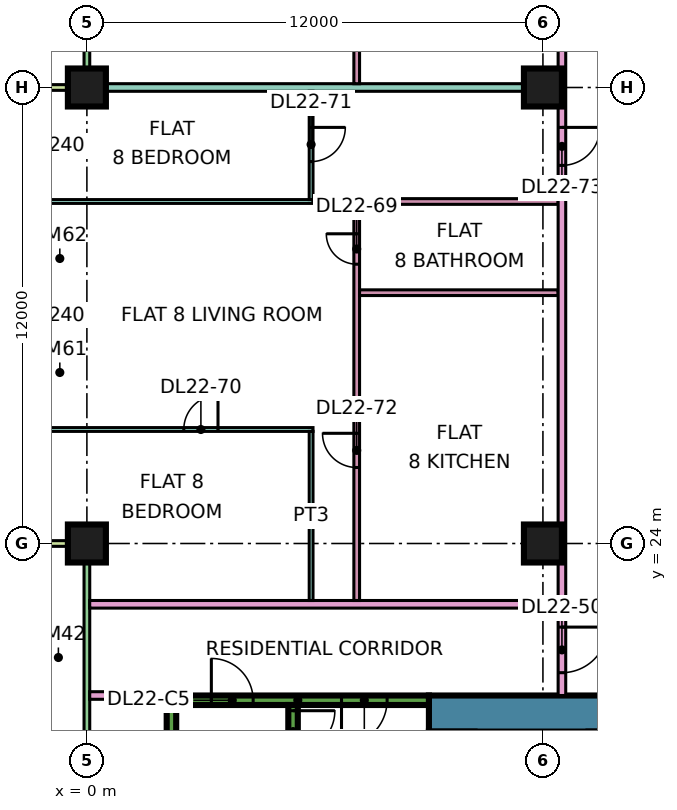
"""IFC4 building model, lengths in metres.
Left out: names, types, materials, properties, quantities, classifications, styles, units other than length and angle.
Written with IfcOpenShell. Run it as: python <this file> out.ifc"""

import sys

from ifc_helpers import new_model, si_unit, direction, frame, frame_2d, origin, origin_2d, place, context, subcontext, project, spatial, rectangle, extrude, element, fill, save


model = new_model("IFC4")
c1 = context("Model", 3, precision=1e-05, world=origin(), true_north=direction((0.0, 1.0)))
c2 = subcontext(c1, "Body", "Model", "MODEL_VIEW")
j1 = project(units=[si_unit("LENGTHUNIT", "METRE"), si_unit("PLANEANGLEUNIT", "RADIAN")], contexts=[c1])
p1 = place(None, origin())
s1 = spatial("IfcSite", under=j1, at=p1, CompositionType="ELEMENT")
p2 = place(p1, origin())
s2 = spatial("IfcBuilding", under=s1, at=p2, CompositionType="ELEMENT")
p3 = place(p2, frame((0.0, 0.0, 99.4)))
s3 = spatial("IfcBuildingStorey", under=s2, at=p3, CompositionType="ELEMENT", Elevation=99.4)
p4 = place(p3, frame((0.0, 24.0, 0.0), z_axis=(0.0, 0.0, 1.0), x_axis=(1.0, 0.0, 0.0)))
e1 = element("IfcColumn", 1, at=p4, inside=s3, PredefinedType="COLUMN", context=c2, shape_type="SweptSolid", body=[
    extrude(rectangle(XDim=1.0, YDim=1.0, at=origin_2d()), origin(), (0.0, 0.0, 1.0), 3.75),
])
p5 = place(p3, frame((0.0, 36.0, 0.0), z_axis=(0.0, 0.0, 1.0), x_axis=(1.0, 0.0, 0.0)))
e2 = element("IfcColumn", 2, at=p5, inside=s3, PredefinedType="COLUMN", context=c2, shape_type="SweptSolid", body=[
    extrude(rectangle(XDim=1.0, YDim=1.0, at=origin_2d()), origin(), (0.0, 0.0, 1.0), 3.75),
])
for number, where, z_axis, x_axis in (
    (3, (12.0, 24.0, 0.0), (0.0, 0.0, 1.0), (1.0, 0.0, 0.0)),
    (4, (12.0, 36.0, 0.0), (0.0, 0.0, 1.0), (1.0, 0.0, 0.0)),
):
    element("IfcColumn", number, at=place(p3, frame(where, z_axis=z_axis, x_axis=x_axis)), inside=s3, PredefinedType="COLUMN", context=c2, shape_type="SweptSolid", body=[
        extrude(rectangle(XDim=1.0, YDim=1.0, at=origin_2d()), origin(), (0.0, 0.0, 1.0), 3.75),
    ])
p6 = place(p3, frame((9.0, 19.525, 0.0), z_axis=(0.0, 0.0, 1.0), x_axis=(1.0, 0.0, 0.0)))
e5 = element("IfcWall", 5, at=p6, inside=s3, PredefinedType="SHEAR", context=c2, shape_type="SweptSolid", body=[
    extrude(rectangle(XDim=25.0, YDim=0.95, at=frame_2d((12.5, 0.0))), origin(), (0.0, 0.0, 1.0), 3.75),
])
p7 = place(p6, frame((19.1, 0.0, 0.0)))
e6 = element("IfcOpeningElement", 6, at=p7, cuts=e5, PredefinedType="OPENING", context=c2, shape_type="SweptSolid", body=[
    extrude(rectangle(XDim=1.8, YDim=2.4, at=frame_2d((0.9, 1.2))), frame((0.0, 0.485, 0.0), z_axis=(0.0, -1.0, 0.0), x_axis=(1.0, 0.0, 0.0)), (0.0, 0.0, 1.0), 0.97),
])
p8 = place(p3, frame((2.1, 19.875, 0.0), z_axis=(0.0, 0.0, 1.0), x_axis=(1.0, 0.0, 0.0)))
e7 = element("IfcWall", 7, at=p8, inside=s3, PredefinedType="SHEAR", context=c2, shape_type="SweptSolid", body=[
    extrude(rectangle(XDim=6.9, YDim=0.25, at=frame_2d((3.45, 0.0))), origin(), (0.0, 0.0, 1.0), 3.75),
])
p9 = place(p8, frame((1.175, 0.0, 0.0)))
e8 = element("IfcOpeningElement", 8, at=p9, cuts=e7, PredefinedType="OPENING", context=c2, shape_type="SweptSolid", body=[
    extrude(rectangle(XDim=1.1, YDim=2.2, at=frame_2d((0.55, 1.1))), frame((0.0, 0.135, 0.0), z_axis=(0.0, -1.0, 0.0), x_axis=(1.0, 0.0, 0.0)), (0.0, 0.0, 1.0), 0.27),
])
p10 = place(p8, frame((4.6, 0.0, 0.0)))
e9 = element("IfcOpeningElement", 9, at=p10, cuts=e7, PredefinedType="OPENING", context=c2, shape_type="SweptSolid", body=[
    extrude(rectangle(XDim=1.2, YDim=2.2, at=frame_2d((0.6, 1.1))), frame((0.0, 0.135, 0.0), z_axis=(0.0, -1.0, 0.0), x_axis=(1.0, 0.0, 0.0)), (0.0, 0.0, 1.0), 0.27),
])
p11 = place(p3, frame((2.225, 13.25, 0.0), z_axis=(0.0, 0.0, 1.0), x_axis=(0.0, 1.0, 0.0)))
e10 = element("IfcWall", 10, at=p11, inside=s3, PredefinedType="SHEAR", context=c2, shape_type="SweptSolid", body=[
    extrude(rectangle(XDim=6.5, YDim=0.25, at=frame_2d((3.25, 0.0))), origin(), (0.0, 0.0, 1.0), 3.75),
])
p12 = place(p3, frame((5.425, 13.25, 0.0), z_axis=(0.0, 0.0, 1.0), x_axis=(0.0, 1.0, 0.0)))
e11 = element("IfcWall", 11, at=p12, inside=s3, PredefinedType="SHEAR", context=c2, shape_type="SweptSolid", body=[
    extrude(rectangle(XDim=6.5, YDim=0.25, at=frame_2d((3.25, 0.0))), origin(), (0.0, 0.0, 1.0), 3.75),
])
p13 = place(p12, frame((5.25, 0.0, 0.0)))
e12 = element("IfcOpeningElement", 12, at=p13, cuts=e11, PredefinedType="OPENING", context=c2, shape_type="SweptSolid", body=[
    extrude(rectangle(XDim=1.1, YDim=2.2, at=frame_2d((0.55, 1.1))), frame((0.0, 0.135, 0.0), z_axis=(0.0, -1.0, 0.0), x_axis=(1.0, 0.0, 0.0)), (0.0, 0.0, 1.0), 0.27),
])
p14 = place(p3, frame((0.0, 47.925, 0.0), z_axis=(0.0, 0.0, 1.0), x_axis=(0.0, -1.0, 0.0)))
e13 = element("IfcWall", 13, at=p14, inside=s3, PredefinedType="SOLIDWALL", context=c2, shape_type="SweptSolid", body=[
    extrude(rectangle(XDim=11.85, YDim=0.15, at=frame_2d((5.925, 0.0))), origin(), (0.0, 0.0, 1.0), 3.35),
])
p15 = place(p14, frame((0.562, 0.0, 0.45)))
e14 = element("IfcOpeningElement", 14, at=p15, cuts=e13, PredefinedType="OPENING", context=c2, shape_type="SweptSolid", body=[
    extrude(rectangle(XDim=1.2, YDim=2.4, at=frame_2d((0.6, 1.2))), frame((0.0, 0.085, 0.0), z_axis=(0.0, -1.0, 0.0), x_axis=(1.0, 0.0, 0.0)), (0.0, 0.0, 1.0), 0.17),
])
p16 = place(p14, frame((4.125, 0.0, 0.0)))
e15 = element("IfcOpeningElement", 15, at=p16, cuts=e13, PredefinedType="OPENING", context=c2, shape_type="SweptSolid", body=[
    extrude(rectangle(XDim=1.2, YDim=2.4, at=frame_2d((0.6, 1.2))), frame((0.0, 0.085, 0.0), z_axis=(0.0, -1.0, 0.0), x_axis=(1.0, 0.0, 0.0)), (0.0, 0.0, 1.0), 0.17),
])
p17 = place(p14, frame((6.525, 0.0, 0.45)))
e16 = element("IfcOpeningElement", 16, at=p17, cuts=e13, PredefinedType="OPENING", context=c2, shape_type="SweptSolid", body=[
    extrude(rectangle(XDim=1.8, YDim=2.4, at=frame_2d((0.9, 1.2))), frame((0.0, 0.085, 0.0), z_axis=(0.0, -1.0, 0.0), x_axis=(1.0, 0.0, 0.0)), (0.0, 0.0, 1.0), 0.17),
])
p18 = place(p14, frame((9.525, 0.0, 0.45)))
e17 = element("IfcOpeningElement", 17, at=p18, cuts=e13, PredefinedType="OPENING", context=c2, shape_type="SweptSolid", body=[
    extrude(rectangle(XDim=1.2, YDim=2.4, at=frame_2d((0.6, 1.2))), frame((0.0, 0.085, 0.0), z_axis=(0.0, -1.0, 0.0), x_axis=(1.0, 0.0, 0.0)), (0.0, 0.0, 1.0), 0.17),
])
p19 = place(p3, frame((-1.5, 36.0, 0.0), z_axis=(0.0, 0.0, 1.0), x_axis=(1.0, 0.0, 0.0)))
e18 = element("IfcWall", 18, at=p19, inside=s3, PredefinedType="SOLIDWALL", context=c2, shape_type="SweptSolid", body=[
    extrude(rectangle(XDim=1.5, YDim=0.15, at=frame_2d((0.75, 0.0))), origin(), (0.0, 0.0, 1.0), 3.35),
])
p20 = place(p3, frame((0.0, 23.925, 0.0), z_axis=(0.0, 0.0, 1.0), x_axis=(0.0, -1.0, 0.0)))
e19 = element("IfcWall", 19, at=p20, inside=s3, PredefinedType="SOLIDWALL", context=c2, shape_type="SweptSolid", body=[
    extrude(rectangle(XDim=11.35, YDim=0.15, at=frame_2d((5.675, 0.0))), origin(), (0.0, 0.0, 1.0), 3.35),
])
p21 = place(p20, frame((6.738, 0.0, 0.0)))
e20 = element("IfcOpeningElement", 20, at=p21, cuts=e19, PredefinedType="OPENING", context=c2, shape_type="SweptSolid", body=[
    extrude(rectangle(XDim=1.8, YDim=2.4, at=frame_2d((0.9, 1.2))), frame((0.0, 0.085, 0.0), z_axis=(0.0, -1.0, 0.0), x_axis=(1.0, 0.0, 0.0)), (0.0, 0.0, 1.0), 0.17),
])
p22 = place(p3, frame((-1.5, 24.0, 0.0), z_axis=(0.0, 0.0, 1.0), x_axis=(1.0, 0.0, 0.0)))
e21 = element("IfcWall", 21, at=p22, inside=s3, PredefinedType="SOLIDWALL", context=c2, shape_type="SweptSolid", body=[
    extrude(rectangle(XDim=1.5, YDim=0.15, at=frame_2d((0.75, 0.0))), origin(), (0.0, 0.0, 1.0), 3.35),
])
p23 = place(p3, frame((-1.35, 27.0, 0.0), z_axis=(0.0, 0.0, 1.0), x_axis=(1.0, 0.0, 0.0)))
e22 = element("IfcWall", 22, at=p23, inside=s3, PredefinedType="PARTITIONING", context=c2, shape_type="SweptSolid", body=[
    extrude(rectangle(XDim=7.3, YDim=0.1, at=frame_2d((3.65, 0.0))), origin(), (0.0, 0.0, 1.0), 3.35),
])
p24 = place(p23, frame((3.9, 0.0, 0.0)))
e23 = element("IfcOpeningElement", 23, at=p24, cuts=e22, PredefinedType="OPENING", context=c2, shape_type="SweptSolid", body=[
    extrude(rectangle(XDim=0.9, YDim=2.1, at=frame_2d((0.45, 1.05))), frame((0.0, 0.06, 0.0), z_axis=(0.0, -1.0, 0.0), x_axis=(1.0, 0.0, 0.0)), (0.0, 0.0, 1.0), 0.12),
])
p25 = place(p3, frame((-1.35, 33.0, 0.0), z_axis=(0.0, 0.0, 1.0), x_axis=(1.0, 0.0, 0.0)))
e24 = element("IfcWall", 24, at=p25, inside=s3, PredefinedType="PARTITIONING", context=c2, shape_type="SweptSolid", body=[
    extrude(rectangle(XDim=7.3, YDim=0.1, at=frame_2d((3.65, 0.0))), origin(), (0.0, 0.0, 1.0), 3.35),
])
e25 = element("IfcWall", 25, at=p5, inside=s3, PredefinedType="PARTITIONING", context=c2, shape_type="SweptSolid", body=[
    extrude(rectangle(XDim=12.4, YDim=0.2, at=frame_2d((6.2, 0.0))), origin(), (0.0, 0.0, 1.0), 3.35),
])
p26 = place(p3, frame((0.074, 20.0, 0.0), z_axis=(0.0, 0.0, 1.0), x_axis=(1.0, 0.0, 0.0)))
e26 = element("IfcWall", 26, at=p26, inside=s3, PredefinedType="PARTITIONING", context=c2, shape_type="SweptSolid", body=[
    extrude(rectangle(XDim=2.026, YDim=0.2, at=frame_2d((1.013, 0.0))), origin(), (0.0, 0.0, 1.0), 3.35),
])
p27 = place(p3, frame((0.074, 22.4, 0.0), z_axis=(0.0, 0.0, 1.0), x_axis=(1.0, 0.0, 0.0)))
e27 = element("IfcWall", 27, at=p27, inside=s3, PredefinedType="PARTITIONING", context=c2, shape_type="SweptSolid", body=[
    extrude(rectangle(XDim=12.326, YDim=0.2, at=frame_2d((6.163, 0.0))), origin(), (0.0, 0.0, 1.0), 3.35),
])
p28 = place(p3, frame((5.9, 22.5, 0.0), z_axis=(0.0, 0.0, 1.0), x_axis=(0.0, 1.0, 0.0)))
e28 = element("IfcWall", 28, at=p28, inside=s3, PredefinedType="PARTITIONING", context=c2, shape_type="SweptSolid", body=[
    extrude(rectangle(XDim=4.45, YDim=0.1, at=frame_2d((2.225, 0.0))), origin(), (0.0, 0.0, 1.0), 3.35),
])
p29 = place(p3, frame((5.9, 33.05, 0.0), z_axis=(0.0, 0.0, 1.0), x_axis=(0.0, 1.0, 0.0)))
e29 = element("IfcWall", 29, at=p29, inside=s3, PredefinedType="PARTITIONING", context=c2, shape_type="SweptSolid", body=[
    extrude(rectangle(XDim=2.85, YDim=0.1, at=frame_2d((1.425, 0.0))), origin(), (0.0, 0.0, 1.0), 3.35),
])
p30 = place(p29, frame((1.0, 0.0, 0.0)))
e30 = element("IfcOpeningElement", 30, at=p30, cuts=e29, PredefinedType="OPENING", context=c2, shape_type="SweptSolid", body=[
    extrude(rectangle(XDim=0.9, YDim=2.1, at=frame_2d((0.45, 1.05))), frame((0.0, 0.06, 0.0), z_axis=(0.0, -1.0, 0.0), x_axis=(1.0, 0.0, 0.0)), (0.0, 0.0, 1.0), 0.12),
])
p31 = place(p3, frame((7.1, 22.5, 0.0), z_axis=(0.0, 0.0, 1.0), x_axis=(0.0, 1.0, 0.0)))
e31 = element("IfcWall", 31, at=p31, inside=s3, PredefinedType="PARTITIONING", context=c2, shape_type="SweptSolid", body=[
    extrude(rectangle(XDim=10.575, YDim=0.15, at=frame_2d((5.288, 0.0))), origin(), (0.0, 0.0, 1.0), 3.35),
])
p32 = place(p31, frame((8.85, 0.0, 0.0)))
e32 = element("IfcOpeningElement", 32, at=p32, cuts=e31, PredefinedType="OPENING", context=c2, shape_type="SweptSolid", body=[
    extrude(rectangle(XDim=0.8, YDim=2.1, at=frame_2d((0.4, 1.05))), frame((0.0, 0.085, 0.0), z_axis=(0.0, -1.0, 0.0), x_axis=(1.0, 0.0, 0.0)), (0.0, 0.0, 1.0), 0.17),
])
p33 = place(p31, frame((3.5, 0.0, 0.0)))
e33 = element("IfcOpeningElement", 33, at=p33, cuts=e31, PredefinedType="OPENING", context=c2, shape_type="SweptSolid", body=[
    extrude(rectangle(XDim=0.9, YDim=2.1, at=frame_2d((0.45, 1.05))), frame((0.0, 0.085, 0.0), z_axis=(0.0, -1.0, 0.0), x_axis=(1.0, 0.0, 0.0)), (0.0, 0.0, 1.0), 0.17),
])
p34 = place(p3, frame((7.1, 36.1, 0.0), z_axis=(0.0, 0.0, 1.0), x_axis=(0.0, 1.0, 0.0)))
e34 = element("IfcWall", 34, at=p34, inside=s3, PredefinedType="PARTITIONING", context=c2, shape_type="SweptSolid", body=[
    extrude(rectangle(XDim=11.375, YDim=0.15, at=frame_2d((5.688, 0.0))), origin(), (0.0, 0.0, 1.0), 3.35),
])
p35 = place(p34, frame((7.4, 0.0, 0.0)))
e35 = element("IfcOpeningElement", 35, at=p35, cuts=e34, PredefinedType="OPENING", context=c2, shape_type="SweptSolid", body=[
    extrude(rectangle(XDim=0.8, YDim=2.1, at=frame_2d((0.4, 1.05))), frame((0.0, 0.085, 0.0), z_axis=(0.0, -1.0, 0.0), x_axis=(1.0, 0.0, 0.0)), (0.0, 0.0, 1.0), 0.17),
])
p36 = place(p34, frame((2.75, 0.0, 0.0)))
e36 = element("IfcOpeningElement", 36, at=p36, cuts=e34, PredefinedType="OPENING", context=c2, shape_type="SweptSolid", body=[
    extrude(rectangle(XDim=0.9, YDim=2.1, at=frame_2d((0.45, 1.05))), frame((0.0, 0.085, 0.0), z_axis=(0.0, -1.0, 0.0), x_axis=(1.0, 0.0, 0.0)), (0.0, 0.0, 1.0), 0.17),
])
p37 = place(p34, frame((9.8, 0.0, 0.0)))
e37 = element("IfcOpeningElement", 37, at=p37, cuts=e34, PredefinedType="OPENING", context=c2, shape_type="SweptSolid", body=[
    extrude(rectangle(XDim=0.8, YDim=2.1, at=frame_2d((0.4, 1.05))), frame((0.0, 0.085, 0.0), z_axis=(0.0, -1.0, 0.0), x_axis=(1.0, 0.0, 0.0)), (0.0, 0.0, 1.0), 0.17),
])
for number, where, z_axis, x_axis in (
    (38, (7.175, 30.6, 0.0), (0.0, 0.0, 1.0), (1.0, 0.0, 0.0)),
    (39, (7.175, 33.0, 0.0), (0.0, 0.0, 1.0), (1.0, 0.0, 0.0)),
):
    element("IfcWall", number, at=place(p3, frame(where, z_axis=z_axis, x_axis=x_axis)), inside=s3, PredefinedType="PARTITIONING", context=c2, shape_type="SweptSolid", body=[
        extrude(rectangle(XDim=5.225, YDim=0.15, at=frame_2d((2.612, 0.0))), origin(), (0.0, 0.0, 1.0), 3.35),
    ])
p38 = place(p3, frame((12.5, 20.0, 0.0), z_axis=(0.0, 0.0, 1.0), x_axis=(0.0, 1.0, 0.0)))
e40 = element("IfcWall", 40, at=p38, inside=s3, PredefinedType="PARTITIONING", context=c2, shape_type="SweptSolid", body=[
    extrude(rectangle(XDim=42.926, YDim=0.2, at=frame_2d((21.463, 0.0))), origin(), (0.0, 0.0, 1.0), 3.35),
])
p39 = place(p38, frame((28.65, 0.0, 0.0)))
e41 = element("IfcOpeningElement", 41, at=p39, cuts=e40, PredefinedType="OPENING", context=c2, shape_type="SweptSolid", body=[
    extrude(rectangle(XDim=1.0, YDim=2.1, at=frame_2d((0.5, 1.05))), frame((0.0, 0.11, 0.0), z_axis=(0.0, -1.0, 0.0), x_axis=(1.0, 0.0, 0.0)), (0.0, 0.0, 1.0), 0.22),
])
p40 = place(p38, frame((32.1, 0.0, 0.0)))
e42 = element("IfcOpeningElement", 42, at=p40, cuts=e40, PredefinedType="OPENING", context=c2, shape_type="SweptSolid", body=[
    extrude(rectangle(XDim=1.0, YDim=2.1, at=frame_2d((0.5, 1.05))), frame((0.0, 0.11, 0.0), z_axis=(0.0, -1.0, 0.0), x_axis=(1.0, 0.0, 0.0)), (0.0, 0.0, 1.0), 0.22),
])
p41 = place(p38, frame((0.6, 0.0, 0.0)))
e43 = element("IfcOpeningElement", 43, at=p41, cuts=e40, PredefinedType="OPENING", context=c2, shape_type="SweptSolid", body=[
    extrude(rectangle(XDim=1.2, YDim=2.1, at=frame_2d((0.6, 1.05))), frame((0.0, 0.11, 0.0), z_axis=(0.0, -1.0, 0.0), x_axis=(1.0, 0.0, 0.0)), (0.0, 0.0, 1.0), 0.22),
])
p42 = place(p38, frame((13.95, 0.0, 0.0)))
e44 = element("IfcOpeningElement", 44, at=p42, cuts=e40, PredefinedType="OPENING", context=c2, shape_type="SweptSolid", body=[
    extrude(rectangle(XDim=1.0, YDim=2.1, at=frame_2d((0.5, 1.05))), frame((0.0, 0.11, 0.0), z_axis=(0.0, -1.0, 0.0), x_axis=(1.0, 0.0, 0.0)), (0.0, 0.0, 1.0), 0.22),
])
p43 = place(p13, origin())
e45 = element("IfcDoor", 45, at=p43, inside=s3, OperationType="SINGLE_SWING_RIGHT", PredefinedType="DOOR", context=c2, shape_type="SweptSolid", body=[
    extrude(rectangle(XDim=1.1, YDim=2.2, at=frame_2d((0.55, 1.1))), frame((0.0, 0.025, 0.0), z_axis=(0.0, -1.0, 0.0), x_axis=(1.0, 0.0, 0.0)), (0.0, 0.0, 1.0), 0.05),
])
fill(e12, e45)
p44 = place(p9, origin())
e46 = element("IfcDoor", 46, at=p44, inside=s3, OperationType="SINGLE_SWING_LEFT", PredefinedType="DOOR", context=c2, shape_type="SweptSolid", body=[
    extrude(rectangle(XDim=1.1, YDim=2.2, at=frame_2d((0.55, 1.1))), frame((0.0, 0.025, 0.0), z_axis=(0.0, -1.0, 0.0), x_axis=(1.0, 0.0, 0.0)), (0.0, 0.0, 1.0), 0.05),
])
fill(e8, e46)
p45 = place(p10, frame((1.2, 0.0, 0.0), z_axis=(0.0, 0.0, 1.0), x_axis=(-1.0, 0.0, 0.0)))
e47 = element("IfcDoor", 47, at=p45, inside=s3, OperationType="SINGLE_SWING_LEFT", PredefinedType="DOOR", context=c2, shape_type="SweptSolid", body=[
    extrude(rectangle(XDim=1.2, YDim=2.2, at=frame_2d((0.6, 1.1))), frame((0.0, 0.025, 0.0), z_axis=(0.0, -1.0, 0.0), x_axis=(1.0, 0.0, 0.0)), (0.0, 0.0, 1.0), 0.05),
])
fill(e9, e47)
p46 = place(p41, origin())
e48 = element("IfcDoor", 48, at=p46, inside=s3, OperationType="SINGLE_SWING_RIGHT", PredefinedType="DOOR", context=c2, shape_type="SweptSolid", body=[
    extrude(rectangle(XDim=1.2, YDim=2.1, at=frame_2d((0.6, 1.05))), frame((0.0, 0.025, 0.0), z_axis=(0.0, -1.0, 0.0), x_axis=(1.0, 0.0, 0.0)), (0.0, 0.0, 1.0), 0.05),
])
fill(e43, e48)
p47 = place(p32, frame((0.8, 0.0, 0.0), z_axis=(0.0, 0.0, 1.0), x_axis=(-1.0, 0.0, 0.0)))
e49 = element("IfcDoor", 49, at=p47, inside=s3, OperationType="SINGLE_SWING_RIGHT", PredefinedType="DOOR", context=c2, shape_type="SweptSolid", body=[
    extrude(rectangle(XDim=0.8, YDim=2.1, at=frame_2d((0.4, 1.05))), frame((0.0, 0.025, 0.0), z_axis=(0.0, -1.0, 0.0), x_axis=(1.0, 0.0, 0.0)), (0.0, 0.0, 1.0), 0.05),
])
fill(e32, e49)
p48 = place(p24, frame((0.9, 0.0, 0.0), z_axis=(0.0, 0.0, 1.0), x_axis=(-1.0, 0.0, 0.0)))
e50 = element("IfcDoor", 50, at=p48, inside=s3, OperationType="SINGLE_SWING_RIGHT", PredefinedType="DOOR", context=c2, shape_type="SweptSolid", body=[
    extrude(rectangle(XDim=0.9, YDim=2.1, at=frame_2d((0.45, 1.05))), frame((0.0, 0.025, 0.0), z_axis=(0.0, -1.0, 0.0), x_axis=(1.0, 0.0, 0.0)), (0.0, 0.0, 1.0), 0.05),
])
fill(e23, e50)
p49 = place(p30, origin())
e51 = element("IfcDoor", 51, at=p49, inside=s3, OperationType="SINGLE_SWING_RIGHT", PredefinedType="DOOR", context=c2, shape_type="SweptSolid", body=[
    extrude(rectangle(XDim=0.9, YDim=2.1, at=frame_2d((0.45, 1.05))), frame((0.0, 0.025, 0.0), z_axis=(0.0, -1.0, 0.0), x_axis=(1.0, 0.0, 0.0)), (0.0, 0.0, 1.0), 0.05),
])
fill(e30, e51)
p50 = place(p33, frame((0.9, 0.0, 0.0), z_axis=(0.0, 0.0, 1.0), x_axis=(-1.0, 0.0, 0.0)))
e52 = element("IfcDoor", 52, at=p50, inside=s3, OperationType="SINGLE_SWING_RIGHT", PredefinedType="DOOR", context=c2, shape_type="SweptSolid", body=[
    extrude(rectangle(XDim=0.9, YDim=2.1, at=frame_2d((0.45, 1.05))), frame((0.0, 0.025, 0.0), z_axis=(0.0, -1.0, 0.0), x_axis=(1.0, 0.0, 0.0)), (0.0, 0.0, 1.0), 0.05),
])
fill(e33, e52)
p51 = place(p42, origin())
e53 = element("IfcDoor", 53, at=p51, inside=s3, OperationType="SINGLE_SWING_RIGHT", PredefinedType="DOOR", context=c2, shape_type="SweptSolid", body=[
    extrude(rectangle(XDim=1.0, YDim=2.1, at=frame_2d((0.5, 1.05))), frame((0.0, 0.025, 0.0), z_axis=(0.0, -1.0, 0.0), x_axis=(1.0, 0.0, 0.0)), (0.0, 0.0, 1.0), 0.05),
])
fill(e44, e53)
save(model, sys.argv[1])
